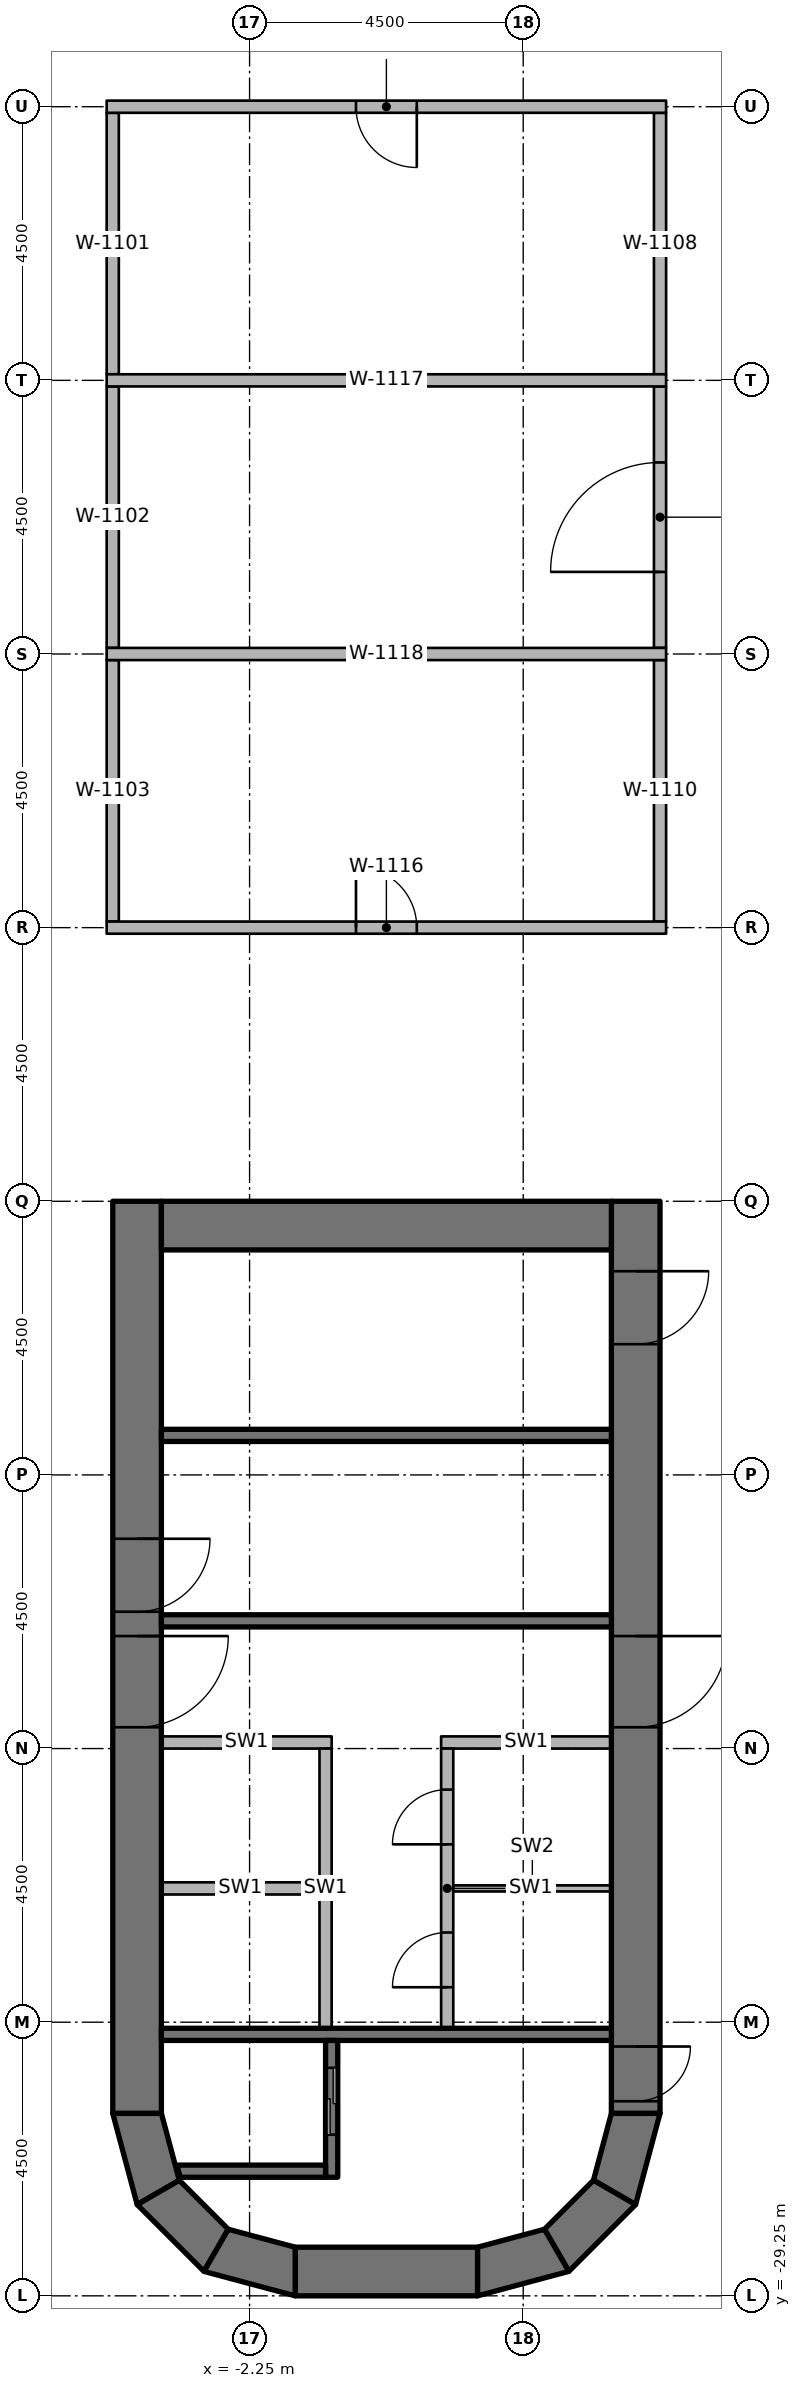
"""IFC4 building model, lengths in metres.
Left out: names, types, materials, properties, quantities, classifications, styles, units other than length and angle.
Written with IfcOpenShell. Run it as: python <this file> out.ifc"""

import sys

from ifc_helpers import new_model, si_unit, direction, frame, frame_2d, origin, place, context, subcontext, project, spatial, polyline, rectangle, outline, extrude, element, fill, save


model = new_model("IFC4")
c1 = context("Model", 3, precision=1e-05, world=origin(), true_north=direction((0.0, 1.0)))
c2 = subcontext(c1, "Body", "Model", "MODEL_VIEW")
j1 = project(units=[si_unit("LENGTHUNIT", "METRE"), si_unit("PLANEANGLEUNIT", "RADIAN")], contexts=[c1])
p1 = place(None, origin())
s1 = spatial("IfcSite", under=j1, at=p1, CompositionType="ELEMENT")
p2 = place(p1, origin())
s2 = spatial("IfcBuilding", under=s1, at=p2, CompositionType="ELEMENT")
p3 = place(p2, frame((0.0, 0.0, 124.6)))
s3 = spatial("IfcBuildingStorey", under=s2, at=p3, CompositionType="ELEMENT", Elevation=124.6)
p4 = place(p3, frame((-4.1, -11.25, 0.0), z_axis=(0.0, 0.0, 1.0), x_axis=(0.0, -1.0, 0.0)))
e1 = element("IfcWall", 1, at=p4, inside=s3, PredefinedType="SHEAR", context=c2, shape_type="SweptSolid", body=[
    extrude(rectangle(XDim=15.0, YDim=0.8, at=frame_2d((7.5, 0.0))), origin(), (0.0, 0.0, 1.0), 3.8),
])
p5 = place(p4, frame((7.15, 0.0, 0.0)))
e2 = element("IfcOpeningElement", 2, at=p5, cuts=e1, PredefinedType="OPENING", context=c2, shape_type="SweptSolid", body=[
    extrude(rectangle(XDim=1.5, YDim=2.3, at=frame_2d((0.75, 1.15))), frame((0.0, 0.41, 0.0), z_axis=(0.0, -1.0, 0.0), x_axis=(1.0, 0.0, 0.0)), (0.0, 0.0, 1.0), 0.82),
])
p6 = place(p4, frame((5.55, 0.0, 0.0)))
e3 = element("IfcOpeningElement", 3, at=p6, cuts=e1, PredefinedType="OPENING", context=c2, shape_type="SweptSolid", body=[
    extrude(rectangle(XDim=1.2, YDim=2.1, at=frame_2d((0.6, 1.05))), frame((0.0, 0.41, 0.0), z_axis=(0.0, -1.0, 0.0), x_axis=(1.0, 0.0, 0.0)), (0.0, 0.0, 1.0), 0.82),
])
p7 = place(p3, frame((4.1, -11.25, 0.0), z_axis=(0.0, 0.0, 1.0), x_axis=(0.0, -1.0, 0.0)))
e4 = element("IfcWall", 4, at=p7, inside=s3, PredefinedType="SHEAR", context=c2, shape_type="SweptSolid", body=[
    extrude(rectangle(XDim=15.0, YDim=0.8, at=frame_2d((7.5, 0.0))), origin(), (0.0, 0.0, 1.0), 3.8),
])
p8 = place(p7, frame((7.15, 0.0, 0.0)))
e5 = element("IfcOpeningElement", 5, at=p8, cuts=e4, PredefinedType="OPENING", context=c2, shape_type="SweptSolid", body=[
    extrude(rectangle(XDim=1.5, YDim=2.3, at=frame_2d((0.75, 1.15))), frame((0.0, 0.41, 0.0), z_axis=(0.0, -1.0, 0.0), x_axis=(1.0, 0.0, 0.0)), (0.0, 0.0, 1.0), 0.82),
])
p9 = place(p7, frame((13.9, 0.0, 0.0)))
e6 = element("IfcOpeningElement", 6, at=p9, cuts=e4, PredefinedType="OPENING", context=c2, shape_type="SweptSolid", body=[
    extrude(rectangle(XDim=0.9, YDim=2.1, at=frame_2d((0.45, 1.05))), frame((0.0, 0.41, 0.0), z_axis=(0.0, -1.0, 0.0), x_axis=(1.0, 0.0, 0.0)), (0.0, 0.0, 1.0), 0.82),
])
p10 = place(p7, frame((1.15, 0.0, 0.0)))
e7 = element("IfcOpeningElement", 7, at=p10, cuts=e4, PredefinedType="OPENING", context=c2, shape_type="SweptSolid", body=[
    extrude(rectangle(XDim=1.2, YDim=2.1, at=frame_2d((0.6, 1.05))), frame((0.0, 0.41, 0.0), z_axis=(0.0, -1.0, 0.0), x_axis=(1.0, 0.0, 0.0)), (0.0, 0.0, 1.0), 0.82),
])
p11 = place(p3, frame((-3.7, -11.65, 0.0), z_axis=(0.0, 0.0, 1.0), x_axis=(1.0, 0.0, 0.0)))
e8 = element("IfcWall", 8, at=p11, inside=s3, PredefinedType="SHEAR", context=c2, shape_type="SweptSolid", body=[
    extrude(rectangle(XDim=7.4, YDim=0.8, at=frame_2d((3.7, 0.0))), origin(), (0.0, 0.0, 1.0), 3.8),
])
p12 = place(p3, frame((-1.5, -28.85, 0.0), z_axis=(0.0, 0.0, 1.0), x_axis=(1.0, 0.0, 0.0)))
e9 = element("IfcWall", 9, at=p12, inside=s3, PredefinedType="SHEAR", context=c2, shape_type="SweptSolid", body=[
    extrude(rectangle(XDim=3.0, YDim=0.8, at=frame_2d((1.5, 0.0))), origin(), (0.0, 0.0, 1.0), 3.8),
])
p13 = place(p3, origin())
e10 = element("IfcWall", 10, at=p13, inside=s3, PredefinedType="SHEAR", context=c2, shape_type="SweptSolid", body=[
    extrude(outline(polyline([(-4.5, -26.25), (-4.098, -27.75), (-3.405, -27.35), (-3.7, -26.25), (-4.5, -26.25)])), origin(), (0.0, 0.0, 1.0), 3.8),
])
p14 = place(p3, origin())
e11 = element("IfcWall", 11, at=p14, inside=s3, PredefinedType="SHEAR", context=c2, shape_type="SweptSolid", body=[
    extrude(outline(polyline([(-4.098, -27.75), (-3.0, -28.848), (-2.6, -28.155), (-3.405, -27.35), (-4.098, -27.75)])), origin(), (0.0, 0.0, 1.0), 3.8),
])
p15 = place(p3, origin())
e12 = element("IfcWall", 12, at=p15, inside=s3, PredefinedType="SHEAR", context=c2, shape_type="SweptSolid", body=[
    extrude(outline(polyline([(-3.0, -28.848), (-1.5, -29.25), (-1.5, -28.45), (-2.6, -28.155), (-3.0, -28.848)])), origin(), (0.0, 0.0, 1.0), 3.8),
])
p16 = place(p3, origin())
e13 = element("IfcWall", 13, at=p16, inside=s3, PredefinedType="SHEAR", context=c2, shape_type="SweptSolid", body=[
    extrude(outline(polyline([(4.5, -26.25), (4.098, -27.75), (3.405, -27.35), (3.7, -26.25), (4.5, -26.25)])), origin(), (0.0, 0.0, 1.0), 3.8),
])
p17 = place(p3, origin())
e14 = element("IfcWall", 14, at=p17, inside=s3, PredefinedType="SHEAR", context=c2, shape_type="SweptSolid", body=[
    extrude(outline(polyline([(4.098, -27.75), (3.0, -28.848), (2.6, -28.155), (3.405, -27.35), (4.098, -27.75)])), origin(), (0.0, 0.0, 1.0), 3.8),
])
p18 = place(p3, origin())
e15 = element("IfcWall", 15, at=p18, inside=s3, PredefinedType="SHEAR", context=c2, shape_type="SweptSolid", body=[
    extrude(outline(polyline([(3.0, -28.848), (1.5, -29.25), (1.5, -28.45), (2.6, -28.155), (3.0, -28.848)])), origin(), (0.0, 0.0, 1.0), 3.8),
])
p19 = place(p3, frame((3.7, -24.95, 0.0), z_axis=(0.0, 0.0, 1.0), x_axis=(-1.0, 0.0, 0.0)))
e16 = element("IfcWall", 16, at=p19, inside=s3, PredefinedType="SHEAR", context=c2, shape_type="SweptSolid", body=[
    extrude(rectangle(XDim=7.4, YDim=0.2, at=frame_2d((3.7, 0.0))), origin(), (0.0, 0.0, 1.0), 3.65),
])
p20 = place(p3, frame((-0.9, -27.3, 0.0), z_axis=(0.0, 0.0, 1.0), x_axis=(0.0, 1.0, 0.0)))
e17 = element("IfcWall", 17, at=p20, inside=s3, PredefinedType="SHEAR", context=c2, shape_type="SweptSolid", body=[
    extrude(rectangle(XDim=2.25, YDim=0.2, at=frame_2d((1.125, 0.0))), origin(), (0.0, 0.0, 1.0), 3.65),
])
p21 = place(p20, frame((0.7, 0.0, 0.0)))
e18 = element("IfcOpeningElement", 18, at=p21, cuts=e17, PredefinedType="OPENING", context=c2, shape_type="SweptSolid", body=[
    extrude(rectangle(XDim=1.1, YDim=2.3, at=frame_2d((0.55, 1.15))), frame((0.0, 0.11, 0.0), z_axis=(0.0, -1.0, 0.0), x_axis=(1.0, 0.0, 0.0)), (0.0, 0.0, 1.0), 0.22),
])
p22 = place(p3, origin())
e19 = element("IfcWall", 19, at=p22, inside=s3, PredefinedType="SHEAR", context=c2, shape_type="SweptSolid", body=[
    extrude(outline(polyline([(-1.0, -27.1), (-3.444, -27.1), (-3.39, -27.3), (-1.0, -27.3), (-1.0, -27.1)])), origin(), (0.0, 0.0, 1.0), 3.65),
])
for number, where, z_axis, x_axis in (
    (20, (3.7, -18.15, 0.0), (0.0, 0.0, 1.0), (-1.0, 0.0, 0.0)),
    (21, (3.7, -15.1, 0.0), (0.0, 0.0, 1.0), (-1.0, 0.0, 0.0)),
):
    element("IfcWall", number, at=place(p3, frame(where, z_axis=z_axis, x_axis=x_axis)), inside=s3, PredefinedType="SHEAR", context=c2, shape_type="SweptSolid", body=[
        extrude(rectangle(XDim=7.4, YDim=0.2, at=frame_2d((3.7, 0.0))), origin(), (0.0, 0.0, 1.0), 3.65),
    ])
p23 = place(p3, frame((3.7, -20.15, 0.0), z_axis=(0.0, 0.0, 1.0), x_axis=(-1.0, 0.0, 0.0)))
e22 = element("IfcWall", 22, at=p23, inside=s3, PredefinedType="PARTITIONING", context=c2, shape_type="SweptSolid", body=[
    extrude(rectangle(XDim=2.8, YDim=0.2, at=frame_2d((1.4, 0.0))), origin(), (0.0, 0.0, 1.0), 3.65),
])
p24 = place(p3, frame((1.0, -24.85, 0.0), z_axis=(0.0, 0.0, 1.0), x_axis=(0.0, 1.0, 0.0)))
e23 = element("IfcWall", 23, at=p24, inside=s3, PredefinedType="PARTITIONING", context=c2, shape_type="SweptSolid", body=[
    extrude(rectangle(XDim=4.6, YDim=0.2, at=frame_2d((2.3, 0.0))), origin(), (0.0, 0.0, 1.0), 3.65),
])
p25 = place(p24, frame((0.675, 0.0, 0.0)))
e24 = element("IfcOpeningElement", 24, at=p25, cuts=e23, PredefinedType="OPENING", context=c2, shape_type="SweptSolid", body=[
    extrude(rectangle(XDim=0.9, YDim=2.1, at=frame_2d((0.45, 1.05))), frame((0.0, 0.11, 0.0), z_axis=(0.0, -1.0, 0.0), x_axis=(1.0, 0.0, 0.0)), (0.0, 0.0, 1.0), 0.22),
])
p26 = place(p24, frame((3.025, 0.0, 0.0)))
e25 = element("IfcOpeningElement", 25, at=p26, cuts=e23, PredefinedType="OPENING", context=c2, shape_type="SweptSolid", body=[
    extrude(rectangle(XDim=0.9, YDim=2.1, at=frame_2d((0.45, 1.05))), frame((0.0, 0.11, 0.0), z_axis=(0.0, -1.0, 0.0), x_axis=(1.0, 0.0, 0.0)), (0.0, 0.0, 1.0), 0.22),
])
p27 = place(p3, frame((-0.9, -20.15, 0.0), z_axis=(0.0, 0.0, 1.0), x_axis=(-1.0, 0.0, 0.0)))
e26 = element("IfcWall", 26, at=p27, inside=s3, PredefinedType="PARTITIONING", context=c2, shape_type="SweptSolid", body=[
    extrude(rectangle(XDim=2.8, YDim=0.2, at=frame_2d((1.4, 0.0))), origin(), (0.0, 0.0, 1.0), 3.65),
])
p28 = place(p3, frame((-1.0, -24.85, 0.0), z_axis=(0.0, 0.0, 1.0), x_axis=(0.0, 1.0, 0.0)))
e27 = element("IfcWall", 27, at=p28, inside=s3, PredefinedType="PARTITIONING", context=c2, shape_type="SweptSolid", body=[
    extrude(rectangle(XDim=4.6, YDim=0.2, at=frame_2d((2.3, 0.0))), origin(), (0.0, 0.0, 1.0), 3.65),
])
p29 = place(p3, frame((3.7, -22.55, 0.0), z_axis=(0.0, 0.0, 1.0), x_axis=(-1.0, 0.0, 0.0)))
e28 = element("IfcWall", 28, at=p29, inside=s3, PredefinedType="PARTITIONING", context=c2, shape_type="SweptSolid", body=[
    extrude(rectangle(XDim=2.6, YDim=0.1, at=frame_2d((1.3, 0.0))), origin(), (0.0, 0.0, 1.0), 3.65),
])
p30 = place(p3, frame((-1.1, -22.55, 0.0), z_axis=(0.0, 0.0, 1.0), x_axis=(-1.0, 0.0, 0.0)))
e29 = element("IfcWall", 29, at=p30, inside=s3, PredefinedType="PARTITIONING", context=c2, shape_type="SweptSolid", body=[
    extrude(rectangle(XDim=2.6, YDim=0.2, at=frame_2d((1.3, 0.0))), origin(), (0.0, 0.0, 1.0), 3.65),
])
for number, where, z_axis, x_axis in (
    (30, (-4.5, 2.35, 0.0), (0.0, 0.0, 1.0), (0.0, 1.0, 0.0)),
    (31, (-4.5, -2.15, 0.0), (0.0, 0.0, 1.0), (0.0, 1.0, 0.0)),
    (32, (-4.5, -6.65, 0.0), (0.0, 0.0, 1.0), (0.0, 1.0, 0.0)),
    (33, (4.5, 2.35, 0.0), (0.0, 0.0, 1.0), (0.0, 1.0, 0.0)),
):
    element("IfcWall", number, at=place(p3, frame(where, z_axis=z_axis, x_axis=x_axis)), inside=s3, PredefinedType="PARTITIONING", context=c2, shape_type="SweptSolid", body=[
        extrude(rectangle(XDim=4.3, YDim=0.2, at=frame_2d((2.15, 0.0))), origin(), (0.0, 0.0, 1.0), 2.738),
    ])
p31 = place(p3, frame((4.5, -2.15, 0.0), z_axis=(0.0, 0.0, 1.0), x_axis=(0.0, 1.0, 0.0)))
e34 = element("IfcWall", 34, at=p31, inside=s3, PredefinedType="PARTITIONING", context=c2, shape_type="SweptSolid", body=[
    extrude(rectangle(XDim=4.3, YDim=0.2, at=frame_2d((2.15, 0.0))), origin(), (0.0, 0.0, 1.0), 2.738),
])
p32 = place(p31, frame((1.25, 0.0, 0.0)))
e35 = element("IfcOpeningElement", 35, at=p32, cuts=e34, PredefinedType="OPENING", context=c2, shape_type="SweptSolid", body=[
    extrude(rectangle(XDim=1.8, YDim=2.1, at=frame_2d((0.9, 1.05))), frame((0.0, 0.11, 0.0), z_axis=(0.0, -1.0, 0.0), x_axis=(1.0, 0.0, 0.0)), (0.0, 0.0, 1.0), 0.22),
])
p33 = place(p3, frame((4.5, -6.65, 0.0), z_axis=(0.0, 0.0, 1.0), x_axis=(0.0, 1.0, 0.0)))
e36 = element("IfcWall", 36, at=p33, inside=s3, PredefinedType="PARTITIONING", context=c2, shape_type="SweptSolid", body=[
    extrude(rectangle(XDim=4.3, YDim=0.2, at=frame_2d((2.15, 0.0))), origin(), (0.0, 0.0, 1.0), 2.738),
])
p34 = place(p3, frame((4.6, 6.75, 0.0), z_axis=(0.0, 0.0, 1.0), x_axis=(-1.0, 0.0, 0.0)))
e37 = element("IfcWall", 37, at=p34, inside=s3, PredefinedType="PARTITIONING", context=c2, shape_type="SweptSolid", body=[
    extrude(rectangle(XDim=9.2, YDim=0.2, at=frame_2d((4.6, 0.0))), origin(), (0.0, 0.0, 1.0), 2.738),
])
p35 = place(p34, frame((4.1, 0.0, 0.0)))
e38 = element("IfcOpeningElement", 38, at=p35, cuts=e37, PredefinedType="OPENING", context=c2, shape_type="SweptSolid", body=[
    extrude(rectangle(XDim=1.0, YDim=2.1, at=frame_2d((0.5, 1.05))), frame((0.0, 0.11, 0.0), z_axis=(0.0, -1.0, 0.0), x_axis=(1.0, 0.0, 0.0)), (0.0, 0.0, 1.0), 0.22),
])
p36 = place(p3, frame((-4.6, -6.75, 0.0), z_axis=(0.0, 0.0, 1.0), x_axis=(1.0, 0.0, 0.0)))
e39 = element("IfcWall", 39, at=p36, inside=s3, PredefinedType="PARTITIONING", context=c2, shape_type="SweptSolid", body=[
    extrude(rectangle(XDim=9.2, YDim=0.2, at=frame_2d((4.6, 0.0))), origin(), (0.0, 0.0, 1.0), 2.738),
])
p37 = place(p36, frame((4.1, 0.0, 0.0)))
e40 = element("IfcOpeningElement", 40, at=p37, cuts=e39, PredefinedType="OPENING", context=c2, shape_type="SweptSolid", body=[
    extrude(rectangle(XDim=1.0, YDim=2.1, at=frame_2d((0.5, 1.05))), frame((0.0, 0.11, 0.0), z_axis=(0.0, -1.0, 0.0), x_axis=(1.0, 0.0, 0.0)), (0.0, 0.0, 1.0), 0.22),
])
for number, where, z_axis, x_axis in (
    (41, (-4.6, 2.25, 0.0), (0.0, 0.0, 1.0), (1.0, 0.0, 0.0)),
    (42, (-4.6, -2.25, 0.0), (0.0, 0.0, 1.0), (1.0, 0.0, 0.0)),
):
    element("IfcWall", number, at=place(p3, frame(where, z_axis=z_axis, x_axis=x_axis)), inside=s3, PredefinedType="PARTITIONING", context=c2, shape_type="SweptSolid", body=[
        extrude(rectangle(XDim=9.2, YDim=0.2, at=frame_2d((4.6, 0.0))), origin(), (0.0, 0.0, 1.0), 2.738),
    ])
p38 = place(p8, origin())
e43 = element("IfcDoor", 43, at=p38, inside=s3, OperationType="DOUBLE_DOOR_SINGLE_SWING", PredefinedType="DOOR", context=c2, shape_type="SweptSolid", body=[
    extrude(rectangle(XDim=1.5, YDim=2.3, at=frame_2d((0.75, 1.15))), frame((0.0, 0.025, 0.0), z_axis=(0.0, -1.0, 0.0), x_axis=(1.0, 0.0, 0.0)), (0.0, 0.0, 1.0), 0.05),
])
fill(e5, e43)
p39 = place(p5, origin())
e44 = element("IfcDoor", 44, at=p39, inside=s3, OperationType="DOUBLE_DOOR_SINGLE_SWING", PredefinedType="DOOR", context=c2, shape_type="SweptSolid", body=[
    extrude(rectangle(XDim=1.5, YDim=2.3, at=frame_2d((0.75, 1.15))), frame((0.0, 0.025, 0.0), z_axis=(0.0, -1.0, 0.0), x_axis=(1.0, 0.0, 0.0)), (0.0, 0.0, 1.0), 0.05),
])
fill(e2, e44)
p40 = place(p9, origin())
e45 = element("IfcDoor", 45, at=p40, inside=s3, OperationType="SINGLE_SWING_LEFT", PredefinedType="DOOR", context=c2, shape_type="SweptSolid", body=[
    extrude(rectangle(XDim=0.9, YDim=2.1, at=frame_2d((0.45, 1.05))), frame((0.0, 0.025, 0.0), z_axis=(0.0, -1.0, 0.0), x_axis=(1.0, 0.0, 0.0)), (0.0, 0.0, 1.0), 0.05),
])
fill(e6, e45)
p41 = place(p6, origin())
e46 = element("IfcDoor", 46, at=p41, inside=s3, OperationType="SINGLE_SWING_LEFT", PredefinedType="DOOR", context=c2, shape_type="SweptSolid", body=[
    extrude(rectangle(XDim=1.2, YDim=2.1, at=frame_2d((0.6, 1.05))), frame((0.0, 0.025, 0.0), z_axis=(0.0, -1.0, 0.0), x_axis=(1.0, 0.0, 0.0)), (0.0, 0.0, 1.0), 0.05),
])
fill(e3, e46)
p42 = place(p10, origin())
e47 = element("IfcDoor", 47, at=p42, inside=s3, OperationType="SINGLE_SWING_LEFT", PredefinedType="DOOR", context=c2, shape_type="SweptSolid", body=[
    extrude(rectangle(XDim=1.2, YDim=2.1, at=frame_2d((0.6, 1.05))), frame((0.0, 0.025, 0.0), z_axis=(0.0, -1.0, 0.0), x_axis=(1.0, 0.0, 0.0)), (0.0, 0.0, 1.0), 0.05),
])
fill(e7, e47)
p43 = place(p21, origin())
e48 = element("IfcDoor", 48, at=p43, inside=s3, OperationType="DOUBLE_DOOR_SLIDING", PredefinedType="DOOR", context=c2, shape_type="SweptSolid", body=[
    extrude(rectangle(XDim=1.1, YDim=2.3, at=frame_2d((0.55, 1.15))), frame((0.0, 0.025, 0.0), z_axis=(0.0, -1.0, 0.0), x_axis=(1.0, 0.0, 0.0)), (0.0, 0.0, 1.0), 0.05),
])
fill(e18, e48)
p44 = place(p25, origin())
e49 = element("IfcDoor", 49, at=p44, inside=s3, OperationType="SINGLE_SWING_LEFT", PredefinedType="DOOR", context=c2, shape_type="SweptSolid", body=[
    extrude(rectangle(XDim=0.9, YDim=2.1, at=frame_2d((0.45, 1.05))), frame((0.0, 0.025, 0.0), z_axis=(0.0, -1.0, 0.0), x_axis=(1.0, 0.0, 0.0)), (0.0, 0.0, 1.0), 0.05),
])
fill(e24, e49)
p45 = place(p26, origin())
e50 = element("IfcDoor", 50, at=p45, inside=s3, OperationType="SINGLE_SWING_LEFT", PredefinedType="DOOR", context=c2, shape_type="SweptSolid", body=[
    extrude(rectangle(XDim=0.9, YDim=2.1, at=frame_2d((0.45, 1.05))), frame((0.0, 0.025, 0.0), z_axis=(0.0, -1.0, 0.0), x_axis=(1.0, 0.0, 0.0)), (0.0, 0.0, 1.0), 0.05),
])
fill(e25, e50)
p46 = place(p32, origin())
e51 = element("IfcDoor", 51, at=p46, inside=s3, OperationType="DOUBLE_DOOR_SINGLE_SWING", PredefinedType="DOOR", context=c2, shape_type="SweptSolid", body=[
    extrude(rectangle(XDim=1.8, YDim=2.1, at=frame_2d((0.9, 1.05))), frame((0.0, 0.025, 0.0), z_axis=(0.0, -1.0, 0.0), x_axis=(1.0, 0.0, 0.0)), (0.0, 0.0, 1.0), 0.05),
])
fill(e35, e51)
p47 = place(p35, origin())
e52 = element("IfcDoor", 52, at=p47, inside=s3, OperationType="SINGLE_SWING_RIGHT", PredefinedType="DOOR", context=c2, shape_type="SweptSolid", body=[
    extrude(rectangle(XDim=1.0, YDim=2.1, at=frame_2d((0.5, 1.05))), frame((0.0, 0.025, 0.0), z_axis=(0.0, -1.0, 0.0), x_axis=(1.0, 0.0, 0.0)), (0.0, 0.0, 1.0), 0.05),
])
fill(e38, e52)
p48 = place(p37, origin())
e53 = element("IfcDoor", 53, at=p48, inside=s3, OperationType="SINGLE_SWING_RIGHT", PredefinedType="DOOR", context=c2, shape_type="SweptSolid", body=[
    extrude(rectangle(XDim=1.0, YDim=2.1, at=frame_2d((0.5, 1.05))), frame((0.0, 0.025, 0.0), z_axis=(0.0, -1.0, 0.0), x_axis=(1.0, 0.0, 0.0)), (0.0, 0.0, 1.0), 0.05),
])
fill(e40, e53)
save(model, sys.argv[1])
